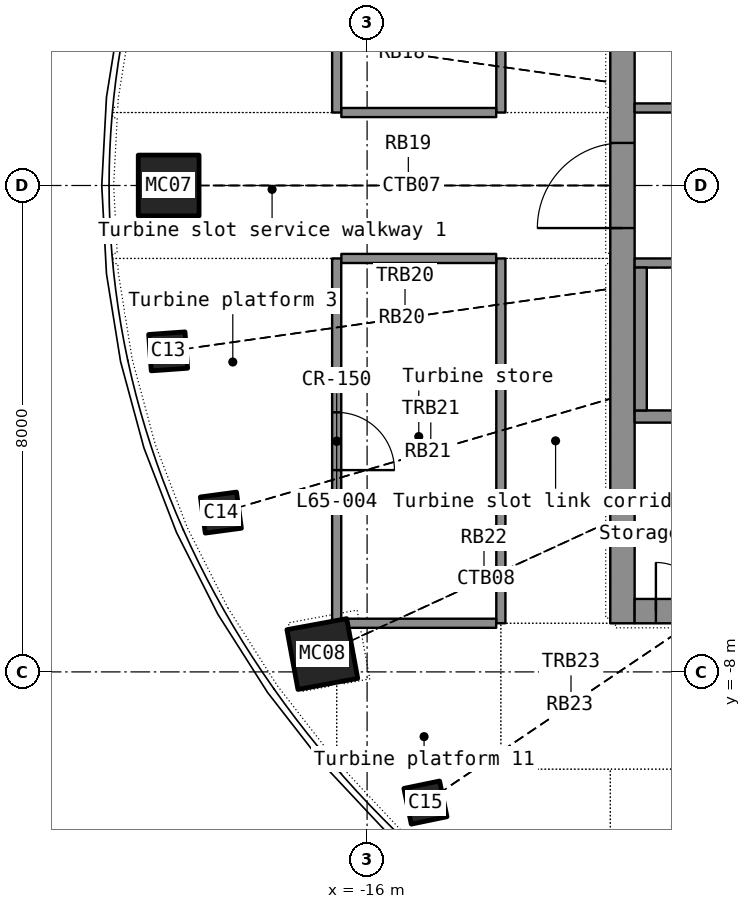
"""IFC4 building model, lengths in metres.
Left out: names, types, materials, properties, quantities, classifications, styles, units other than length and angle.
Written with IfcOpenShell. Run it as: python <this file> out.ifc"""

import sys

from ifc_helpers import new_model, si_unit, direction, frame, frame_2d, origin, origin_2d, place, context, subcontext, project, spatial, rectangle, hollow_rectangle, extrude, element, fill, save


model = new_model("IFC4")
c1 = context("Model", 3, precision=1e-05, world=origin(), true_north=direction((0.0, 1.0)))
c2 = subcontext(c1, "Body", "Model", "MODEL_VIEW")
j1 = project(units=[si_unit("LENGTHUNIT", "METRE"), si_unit("PLANEANGLEUNIT", "RADIAN")], contexts=[c1])
p1 = place(None, origin())
s1 = spatial("IfcSite", under=j1, at=p1, CompositionType="ELEMENT")
p2 = place(p1, origin())
s2 = spatial("IfcBuilding", under=s1, at=p2, CompositionType="ELEMENT")
p3 = place(p2, frame((0.0, 0.0, 265.2)))
s3 = spatial("IfcBuildingStorey", under=s2, at=p3, CompositionType="ELEMENT", Elevation=265.2)
p4 = place(p3, frame((-19.263, 0.0, 0.0), z_axis=(0.034587192, 0.0, 0.999401684), x_axis=(0.0, 1.0, 0.0)))
e1 = element("IfcColumn", 1, at=p4, inside=s3, PredefinedType="COLUMN", context=c2, shape_type="SweptSolid", body=[
    extrude(hollow_rectangle(XDim=1.0, YDim=1.0, WallThickness=0.032, at=origin_2d()), origin(), (0.0, 0.0, 1.0), 7.405),
])
p5 = place(p3, frame((-19.272, -2.728, 0.0), z_axis=(0.034059852, 0.004912796, 0.99940772), x_axis=(-0.21296706, 0.977056295, 0.002455003)))
e2 = element("IfcColumn", 2, at=p5, inside=s3, PredefinedType="COLUMN", context=c2, shape_type="SweptSolid", body=[
    extrude(hollow_rectangle(XDim=0.6, YDim=0.6, WallThickness=0.025, at=origin_2d()), origin(), (0.0, 0.0, 1.0), 7.405),
])
p6 = place(p3, frame((-18.404, -5.38, 0.0), z_axis=(0.032477793, 0.009660907, 0.999425765), x_axis=(-0.410307078, 0.911936229, 0.004518332)))
e3 = element("IfcColumn", 3, at=p6, inside=s3, PredefinedType="COLUMN", context=c2, shape_type="SweptSolid", body=[
    extrude(hollow_rectangle(XDim=0.6, YDim=0.6, WallThickness=0.025, at=origin_2d()), origin(), (0.0, 0.0, 1.0), 7.404),
])
p7 = place(p3, frame((-16.736, -7.706, 0.0), z_axis=(0.02993968, 0.014178483, 0.999451142), x_axis=(-0.58479336, 0.811160032, 0.006010807)))
e4 = element("IfcColumn", 4, at=p7, inside=s3, PredefinedType="COLUMN", context=c2, shape_type="SweptSolid", body=[
    extrude(hollow_rectangle(XDim=1.0, YDim=1.0, WallThickness=0.032, at=origin_2d()), origin(), (0.0, 0.0, 1.0), 7.404),
])
p8 = place(p3, frame((-15.041, -10.149, 0.0), z_axis=(0.026511305, 0.018201791, 0.999482789), x_axis=(-0.721084308, 0.692816746, 0.006509747)))
e5 = element("IfcColumn", 5, at=p8, inside=s3, PredefinedType="COLUMN", context=c2, shape_type="SweptSolid", body=[
    extrude(hollow_rectangle(XDim=0.6, YDim=0.6, WallThickness=0.025, at=origin_2d()), origin(), (0.0, 0.0, 1.0), 7.404),
])
p9 = place(p3, frame((-11.8, -7.2, 0.0), z_axis=(0.0, 0.0, 1.0), x_axis=(0.0, 1.0, 0.0)))
e6 = element("IfcWall", 6, at=p9, inside=s3, PredefinedType="SHEAR", context=c2, shape_type="SweptSolid", body=[
    extrude(rectangle(XDim=14.4, YDim=0.4, at=frame_2d((7.2, 0.0))), origin(), (0.0, 0.0, 1.0), 6.9),
])
p10 = place(p9, frame((6.5, 0.0, 0.0)))
e7 = element("IfcOpeningElement", 7, at=p10, cuts=e6, PredefinedType="OPENING", context=c2, shape_type="SweptSolid", body=[
    extrude(rectangle(XDim=1.4, YDim=2.2, at=frame_2d((0.7, 1.1))), frame((0.0, 0.21, 0.0), z_axis=(0.0, -1.0, 0.0), x_axis=(1.0, 0.0, 0.0)), (0.0, 0.0, 1.0), 0.42),
])
p11 = place(p3, frame((-11.6, -7.0, 0.0), z_axis=(0.0, 0.0, 1.0), x_axis=(1.0, 0.0, 0.0)))
e8 = element("IfcWall", 8, at=p11, inside=s3, PredefinedType="SHEAR", context=c2, shape_type="SweptSolid", body=[
    extrude(rectangle(XDim=23.2, YDim=0.4, at=frame_2d((11.6, 0.0))), origin(), (0.0, 0.0, 1.0), 6.9),
])
p12 = place(p11, frame((20.05, 0.0, 0.0)))
e9 = element("IfcOpeningElement", 9, at=p12, cuts=e8, PredefinedType="OPENING", context=c2, shape_type="SweptSolid", body=[
    extrude(rectangle(XDim=1.1, YDim=2.2, at=frame_2d((0.55, 1.1))), frame((0.0, 0.21, 0.0), z_axis=(0.0, -1.0, 0.0), x_axis=(1.0, 0.0, 0.0)), (0.0, 0.0, 1.0), 0.42),
])
p13 = place(p11, frame((4.15, 0.0, 0.0)))
e10 = element("IfcOpeningElement", 10, at=p13, cuts=e8, PredefinedType="OPENING", context=c2, shape_type="SweptSolid", body=[
    extrude(rectangle(XDim=0.9, YDim=2.1, at=frame_2d((0.45, 1.05))), frame((0.0, 0.21, 0.0), z_axis=(0.0, -1.0, 0.0), x_axis=(1.0, 0.0, 0.0)), (0.0, 0.0, 1.0), 0.42),
])
p14 = place(p11, frame((11.15, 0.0, 0.0)))
e11 = element("IfcOpeningElement", 11, at=p14, cuts=e8, PredefinedType="OPENING", context=c2, shape_type="SweptSolid", body=[
    extrude(rectangle(XDim=0.9, YDim=2.1, at=frame_2d((0.45, 1.05))), frame((0.0, 0.21, 0.0), z_axis=(0.0, -1.0, 0.0), x_axis=(1.0, 0.0, 0.0)), (0.0, 0.0, 1.0), 0.42),
])
p15 = place(p11, frame((17.15, 0.0, 0.0)))
e12 = element("IfcOpeningElement", 12, at=p15, cuts=e8, PredefinedType="OPENING", context=c2, shape_type="SweptSolid", body=[
    extrude(rectangle(XDim=0.9, YDim=2.1, at=frame_2d((0.45, 1.05))), frame((0.0, 0.21, 0.0), z_axis=(0.0, -1.0, 0.0), x_axis=(1.0, 0.0, 0.0)), (0.0, 0.0, 1.0), 0.42),
])
p16 = place(p11, frame((0.35, 0.0, 0.0)))
e13 = element("IfcOpeningElement", 13, at=p16, cuts=e8, PredefinedType="OPENING", context=c2, shape_type="SweptSolid", body=[
    extrude(rectangle(XDim=0.8, YDim=2.05, at=frame_2d((0.4, 1.025))), frame((0.0, 0.21, 0.0), z_axis=(0.0, -1.0, 0.0), x_axis=(1.0, 0.0, 0.0)), (0.0, 0.0, 1.0), 0.42),
])
p17 = place(p11, frame((22.05, 0.0, 0.0)))
e14 = element("IfcOpeningElement", 14, at=p17, cuts=e8, PredefinedType="OPENING", context=c2, shape_type="SweptSolid", body=[
    extrude(rectangle(XDim=0.8, YDim=2.05, at=frame_2d((0.4, 1.025))), frame((0.0, 0.21, 0.0), z_axis=(0.0, -1.0, 0.0), x_axis=(1.0, 0.0, 0.0)), (0.0, 0.0, 1.0), 0.42),
])
p18 = place(p3, frame((-11.6, -3.8, 0.0), z_axis=(0.0, 0.0, 1.0), x_axis=(1.0, 0.0, 0.0)))
e15 = element("IfcWall", 15, at=p18, inside=s3, PredefinedType="SHEAR", context=c2, shape_type="SweptSolid", body=[
    extrude(rectangle(XDim=23.2, YDim=0.2, at=frame_2d((11.6, 0.0))), origin(), (0.0, 0.0, 1.0), 6.9),
])
p19 = place(p3, frame((-11.6, -1.275, 0.0), z_axis=(0.0, 0.0, 1.0), x_axis=(1.0, 0.0, 0.0)))
e16 = element("IfcWall", 16, at=p19, inside=s3, PredefinedType="SHEAR", context=c2, shape_type="SweptSolid", body=[
    extrude(rectangle(XDim=8.6, YDim=0.15, at=frame_2d((4.3, 0.0))), origin(), (0.0, 0.0, 1.0), 6.9),
])
p20 = place(p19, frame((5.45, 0.0, 0.0)))
e17 = element("IfcOpeningElement", 17, at=p20, cuts=e16, PredefinedType="OPENING", context=c2, shape_type="SweptSolid", body=[
    extrude(rectangle(XDim=1.1, YDim=2.15, at=frame_2d((0.55, 1.075))), frame((0.0, 0.085, 0.0), z_axis=(0.0, -1.0, 0.0), x_axis=(1.0, 0.0, 0.0)), (0.0, 0.0, 1.0), 0.17),
])
p21 = place(p3, frame((-11.6, 1.275, 0.0), z_axis=(0.0, 0.0, 1.0), x_axis=(1.0, 0.0, 0.0)))
e18 = element("IfcWall", 18, at=p21, inside=s3, PredefinedType="PARTITIONING", context=c2, shape_type="SweptSolid", body=[
    extrude(rectangle(XDim=8.6, YDim=0.15, at=frame_2d((4.3, 0.0))), origin(), (0.0, 0.0, 1.0), 6.9),
])
p22 = place(p21, frame((0.798, 0.0, 0.0)))
e19 = element("IfcOpeningElement", 19, at=p22, cuts=e18, PredefinedType="OPENING", context=c2, shape_type="SweptSolid", body=[
    extrude(rectangle(XDim=0.85, YDim=2.1, at=frame_2d((0.425, 1.05))), frame((0.0, 0.085, 0.0), z_axis=(0.0, -1.0, 0.0), x_axis=(1.0, 0.0, 0.0)), (0.0, 0.0, 1.0), 0.17),
])
p23 = place(p21, frame((3.393, 0.0, 0.0)))
e20 = element("IfcOpeningElement", 20, at=p23, cuts=e18, PredefinedType="OPENING", context=c2, shape_type="SweptSolid", body=[
    extrude(rectangle(XDim=0.85, YDim=2.1, at=frame_2d((0.425, 1.05))), frame((0.0, 0.085, 0.0), z_axis=(0.0, -1.0, 0.0), x_axis=(1.0, 0.0, 0.0)), (0.0, 0.0, 1.0), 0.17),
])
p24 = place(p21, frame((5.555, 0.0, 0.0)))
e21 = element("IfcOpeningElement", 21, at=p24, cuts=e18, PredefinedType="OPENING", context=c2, shape_type="SweptSolid", body=[
    extrude(rectangle(XDim=0.9, YDim=2.1, at=frame_2d((0.45, 1.05))), frame((0.0, 0.085, 0.0), z_axis=(0.0, -1.0, 0.0), x_axis=(1.0, 0.0, 0.0)), (0.0, 0.0, 1.0), 0.17),
])
p25 = place(p21, frame((7.335, 0.0, 0.0)))
e22 = element("IfcOpeningElement", 22, at=p25, cuts=e18, PredefinedType="OPENING", context=c2, shape_type="SweptSolid", body=[
    extrude(rectangle(XDim=0.9, YDim=2.1, at=frame_2d((0.45, 1.05))), frame((0.0, 0.085, 0.0), z_axis=(0.0, -1.0, 0.0), x_axis=(1.0, 0.0, 0.0)), (0.0, 0.0, 1.0), 0.17),
])
p26 = place(p3, frame((-11.5, -3.7, 0.0), z_axis=(0.0, 0.0, 1.0), x_axis=(0.0, 1.0, 0.0)))
e23 = element("IfcWall", 23, at=p26, inside=s3, PredefinedType="SHEAR", context=c2, shape_type="SweptSolid", body=[
    extrude(rectangle(XDim=2.35, YDim=0.2, at=frame_2d((1.175, 0.0))), origin(), (0.0, 0.0, 1.0), 6.9),
])
p27 = place(p3, frame((-16.5, -1.2, 0.0), z_axis=(0.0, 0.0, 1.0), x_axis=(0.0, -1.0, 0.0)))
e24 = element("IfcWall", 24, at=p27, inside=s3, PredefinedType="PARTITIONING", context=c2, shape_type="SweptSolid", body=[
    extrude(rectangle(XDim=6.012, YDim=0.15, at=frame_2d((3.006, 0.0))), origin(), (0.0, 0.0, 1.0), 6.1),
])
p28 = place(p27, frame((2.531, 0.0, 0.0)))
e25 = element("IfcOpeningElement", 25, at=p28, cuts=e24, PredefinedType="OPENING", context=c2, shape_type="SweptSolid", body=[
    extrude(rectangle(XDim=0.95, YDim=2.15, at=frame_2d((0.475, 1.075))), frame((0.0, 0.085, 0.0), z_axis=(0.0, -1.0, 0.0), x_axis=(1.0, 0.0, 0.0)), (0.0, 0.0, 1.0), 0.17),
])
p29 = place(p3, frame((-16.5, 7.212, 0.0), z_axis=(0.0, 0.0, 1.0), x_axis=(0.0, -1.0, 0.0)))
e26 = element("IfcWall", 26, at=p29, inside=s3, PredefinedType="PARTITIONING", context=c2, shape_type="SweptSolid", body=[
    extrude(rectangle(XDim=6.012, YDim=0.15, at=frame_2d((3.006, 0.0))), origin(), (0.0, 0.0, 1.0), 6.1),
])
p30 = place(p29, frame((2.531, 0.0, 0.0)))
e27 = element("IfcOpeningElement", 27, at=p30, cuts=e26, PredefinedType="OPENING", context=c2, shape_type="SweptSolid", body=[
    extrude(rectangle(XDim=0.95, YDim=2.15, at=frame_2d((0.475, 1.075))), frame((0.0, 0.085, 0.0), z_axis=(0.0, -1.0, 0.0), x_axis=(1.0, 0.0, 0.0)), (0.0, 0.0, 1.0), 0.17),
])
for number, where, z_axis, x_axis in (
    (28, (-13.8, -1.2, 0.0), (0.0, 0.0, 1.0), (0.0, -1.0, 0.0)),
    (29, (-13.8, 7.2, 0.0), (0.0, 0.0, 1.0), (0.0, -1.0, 0.0)),
):
    element("IfcWall", number, at=place(p3, frame(where, z_axis=z_axis, x_axis=x_axis)), inside=s3, PredefinedType="PARTITIONING", context=c2, shape_type="SweptSolid", body=[
        extrude(rectangle(XDim=6.0, YDim=0.15, at=frame_2d((3.0, 0.0))), origin(), (0.0, 0.0, 1.0), 6.1),
    ])
for number, where, z_axis, x_axis in (
    (30, (-16.423, -7.2, 0.0), (0.0, 0.0, 1.0), (1.0, 0.0, 0.0)),
    (31, (-16.423, -1.2, 0.0), (0.0, 0.0, 1.0), (1.0, 0.0, 0.0)),
    (32, (-13.877, 1.2, 0.0), (0.0, 0.0, 1.0), (-1.0, 0.0, 0.0)),
):
    element("IfcWall", number, at=place(p3, frame(where, z_axis=z_axis, x_axis=x_axis)), inside=s3, PredefinedType="PARTITIONING", context=c2, shape_type="SweptSolid", body=[
        extrude(rectangle(XDim=2.546, YDim=0.15, at=frame_2d((1.273, 0.0))), origin(), (0.0, 0.0, 1.0), 6.1),
    ])
p31 = place(p16, origin())
e33 = element("IfcDoor", 33, at=p31, inside=s3, OperationType="SINGLE_SWING_LEFT", PredefinedType="DOOR", context=c2, shape_type="SweptSolid", body=[
    extrude(rectangle(XDim=0.8, YDim=2.05, at=frame_2d((0.4, 1.025))), frame((0.0, 0.025, 0.0), z_axis=(0.0, -1.0, 0.0), x_axis=(1.0, 0.0, 0.0)), (0.0, 0.0, 1.0), 0.05),
])
fill(e13, e33)
p32 = place(p10, origin())
e34 = element("IfcDoor", 34, at=p32, inside=s3, OperationType="DOUBLE_DOOR_SINGLE_SWING", PredefinedType="DOOR", context=c2, shape_type="SweptSolid", body=[
    extrude(rectangle(XDim=1.4, YDim=2.2, at=frame_2d((0.7, 1.1))), frame((0.0, 0.025, 0.0), z_axis=(0.0, -1.0, 0.0), x_axis=(1.0, 0.0, 0.0)), (0.0, 0.0, 1.0), 0.05),
])
fill(e7, e34)
p33 = place(p28, origin())
e35 = element("IfcDoor", 35, at=p33, inside=s3, OperationType="SINGLE_SWING_RIGHT", PredefinedType="DOOR", context=c2, shape_type="SweptSolid", body=[
    extrude(rectangle(XDim=0.95, YDim=2.15, at=frame_2d((0.475, 1.075))), frame((0.0, 0.025, 0.0), z_axis=(0.0, -1.0, 0.0), x_axis=(1.0, 0.0, 0.0)), (0.0, 0.0, 1.0), 0.05),
])
fill(e25, e35)
save(model, sys.argv[1])
